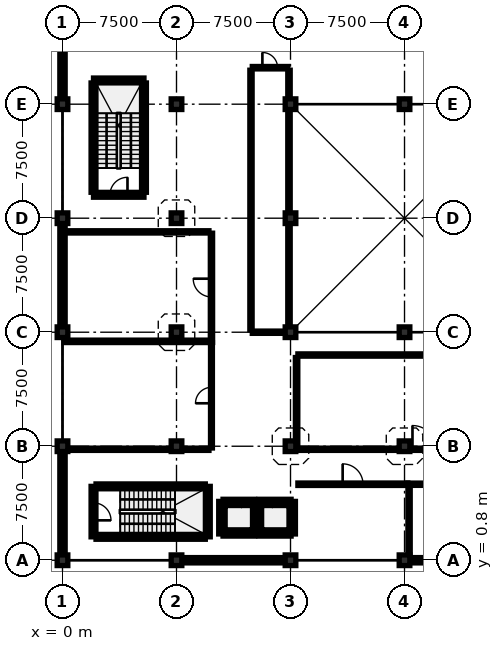
"""IFC4 building model, lengths in metres.
Left out: names, types, materials, properties, quantities, classifications, styles, units other than length and angle.
Written with IfcOpenShell. Run it as: python <this file> out.ifc"""

import sys

from ifc_helpers import new_model, si_unit, direction, frame, frame_2d, origin, origin_2d, place, context, subcontext, project, spatial, rectangle, extrude, element, fill, save


model = new_model("IFC4")
c1 = context("Model", 3, precision=1e-05, world=origin(), true_north=direction((0.0, 1.0)))
c2 = subcontext(c1, "Body", "Model", "MODEL_VIEW")
j1 = project(units=[si_unit("LENGTHUNIT", "METRE"), si_unit("PLANEANGLEUNIT", "RADIAN")], contexts=[c1])
p1 = place(None, origin())
s1 = spatial("IfcSite", under=j1, at=p1, CompositionType="ELEMENT")
p2 = place(p1, origin())
s2 = spatial("IfcBuilding", under=s1, at=p2, CompositionType="ELEMENT")
p3 = place(p2, frame((0.0, 0.0, 5.0)))
s3 = spatial("IfcBuildingStorey", under=s2, at=p3, CompositionType="ELEMENT", Elevation=5.0)
for number, where, z_axis, x_axis in (
    (1, (0.0, 0.8, 0.0), (0.0, 0.0, 1.0), (1.0, 0.0, 0.0)),
    (2, (0.0, 8.3, 0.0), (0.0, 0.0, 1.0), (1.0, 0.0, 0.0)),
    (3, (0.0, 15.8, 0.0), (0.0, 0.0, 1.0), (1.0, 0.0, 0.0)),
    (4, (0.0, 23.3, 0.0), (0.0, 0.0, 1.0), (1.0, 0.0, 0.0)),
    (5, (0.0, 30.8, 0.0), (0.0, 0.0, 1.0), (1.0, 0.0, 0.0)),
    (6, (7.5, 0.8, 0.0), (0.0, 0.0, 1.0), (1.0, 0.0, 0.0)),
    (7, (7.5, 8.3, 0.0), (0.0, 0.0, 1.0), (1.0, 0.0, 0.0)),
    (8, (7.5, 15.8, 0.0), (0.0, 0.0, 1.0), (1.0, 0.0, 0.0)),
    (9, (7.5, 23.3, 0.0), (0.0, 0.0, 1.0), (1.0, 0.0, 0.0)),
    (10, (7.5, 30.8, 0.0), (0.0, 0.0, 1.0), (1.0, 0.0, 0.0)),
    (11, (15.0, 0.8, 0.0), (0.0, 0.0, 1.0), (1.0, 0.0, 0.0)),
    (12, (15.0, 8.3, 0.0), (0.0, 0.0, 1.0), (1.0, 0.0, 0.0)),
    (13, (15.0, 15.8, 0.0), (0.0, 0.0, 1.0), (1.0, 0.0, 0.0)),
    (14, (15.0, 23.3, 0.0), (0.0, 0.0, 1.0), (1.0, 0.0, 0.0)),
    (15, (15.0, 30.8, 0.0), (0.0, 0.0, 1.0), (1.0, 0.0, 0.0)),
    (16, (22.5, 0.8, 0.0), (0.0, 0.0, 1.0), (1.0, 0.0, 0.0)),
    (17, (22.5, 8.3, 0.0), (0.0, 0.0, 1.0), (1.0, 0.0, 0.0)),
    (18, (22.5, 15.8, 0.0), (0.0, 0.0, 1.0), (1.0, 0.0, 0.0)),
    (19, (22.5, 30.8, 0.0), (0.0, 0.0, 1.0), (1.0, 0.0, 0.0)),
):
    element("IfcColumn", number, at=place(p3, frame(where, z_axis=z_axis, x_axis=x_axis)), inside=s3, PredefinedType="COLUMN", context=c2, shape_type="SweptSolid", body=[
        extrude(rectangle(XDim=0.7, YDim=0.7, at=origin_2d()), origin(), (0.0, 0.0, 1.0), 4.2),
    ])
p4 = place(p3, frame((29.65, 0.8, 0.0), z_axis=(0.0, 0.0, 1.0), x_axis=(-1.0, 0.0, 0.0)))
e20 = element("IfcWall", 20, at=p4, inside=s3, PredefinedType="SOLIDWALL", context=c2, shape_type="SweptSolid", body=[
    extrude(rectangle(XDim=6.8, YDim=0.35, at=frame_2d((3.4, 0.0))), origin(), (0.0, 0.0, 1.0), 3.535),
])
p5 = place(p3, frame((14.65, 0.8, 0.0), z_axis=(0.0, 0.0, 1.0), x_axis=(-1.0, 0.0, 0.0)))
e21 = element("IfcWall", 21, at=p5, inside=s3, PredefinedType="SOLIDWALL", context=c2, shape_type="SweptSolid", body=[
    extrude(rectangle(XDim=6.8, YDim=0.35, at=frame_2d((3.4, 0.0))), origin(), (0.0, 0.0, 1.0), 3.535),
])
p6 = place(p5, frame((2.6, 0.0, 0.9)))
e22 = element("IfcOpeningElement", 22, at=p6, cuts=e21, PredefinedType="OPENING", context=c2, shape_type="SweptSolid", body=[
    extrude(rectangle(XDim=1.6, YDim=1.7, at=frame_2d((0.8, 0.85))), frame((0.0, 0.187, 0.0), z_axis=(0.0, -1.0, 0.0), x_axis=(1.0, 0.0, 0.0)), (0.0, 0.0, 1.0), 0.374),
])
for number, where, z_axis, x_axis in (
    (23, (0.0, 1.15, 0.0), (0.0, 0.0, 1.0), (0.0, 1.0, 0.0)),
    (24, (0.0, 16.15, 0.0), (0.0, 0.0, 1.0), (0.0, 1.0, 0.0)),
    (25, (0.0, 31.15, 0.0), (0.0, 0.0, 1.0), (0.0, 1.0, 0.0)),
):
    element("IfcWall", number, at=place(p3, frame(where, z_axis=z_axis, x_axis=x_axis)), inside=s3, PredefinedType="SOLIDWALL", context=c2, shape_type="SweptSolid", body=[
        extrude(rectangle(XDim=6.8, YDim=0.35, at=frame_2d((3.4, 0.0))), origin(), (0.0, 0.0, 1.0), 3.535),
    ])
p7 = place(p3, frame((2.205, 2.34, 0.0), z_axis=(0.0, 0.0, 1.0), x_axis=(1.0, 0.0, 0.0)))
e26 = element("IfcWall", 26, at=p7, inside=s3, PredefinedType="SHEAR", context=c2, shape_type="SweptSolid", body=[
    extrude(rectangle(XDim=7.19, YDim=0.32, at=frame_2d((3.595, 0.0))), origin(), (0.0, 0.0, 1.0), 4.2),
])
p8 = place(p3, frame((9.56, 2.34, 0.0), z_axis=(0.0, 0.0, 1.0), x_axis=(0.0, 1.0, 0.0)))
e27 = element("IfcWall", 27, at=p8, inside=s3, PredefinedType="SHEAR", context=c2, shape_type="SweptSolid", body=[
    extrude(rectangle(XDim=3.32, YDim=0.32, at=frame_2d((1.66, 0.0))), origin(), (0.0, 0.0, 1.0), 4.2),
])
p9 = place(p3, frame((9.395, 5.66, 0.0), z_axis=(0.0, 0.0, 1.0), x_axis=(-1.0, 0.0, 0.0)))
e28 = element("IfcWall", 28, at=p9, inside=s3, PredefinedType="SHEAR", context=c2, shape_type="SweptSolid", body=[
    extrude(rectangle(XDim=7.19, YDim=0.32, at=frame_2d((3.595, 0.0))), origin(), (0.0, 0.0, 1.0), 4.2),
])
p10 = place(p3, frame((2.04, 5.66, 0.0), z_axis=(0.0, 0.0, 1.0), x_axis=(0.0, -1.0, 0.0)))
e29 = element("IfcWall", 29, at=p10, inside=s3, PredefinedType="SHEAR", context=c2, shape_type="SweptSolid", body=[
    extrude(rectangle(XDim=3.32, YDim=0.32, at=frame_2d((1.66, 0.0))), origin(), (0.0, 0.0, 1.0), 4.2),
])
p11 = place(p10, frame((1.085, 0.0, 0.0)))
e30 = element("IfcOpeningElement", 30, at=p11, cuts=e29, PredefinedType="OPENING", context=c2, shape_type="SweptSolid", body=[
    extrude(rectangle(XDim=1.15, YDim=2.15, at=frame_2d((0.575, 1.075))), frame((0.0, 0.172, 0.0), z_axis=(0.0, -1.0, 0.0), x_axis=(1.0, 0.0, 0.0)), (0.0, 0.0, 1.0), 0.344),
])
p12 = place(p3, frame((10.562, 2.529, 0.0), z_axis=(0.0, 0.0, 1.0), x_axis=(1.0, 0.0, 0.0)))
e31 = element("IfcWall", 31, at=p12, inside=s3, PredefinedType="SHEAR", context=c2, shape_type="SweptSolid", body=[
    extrude(rectangle(XDim=2.077, YDim=0.28, at=frame_2d((1.039, 0.0))), origin(), (0.0, 0.0, 1.0), 4.2),
])
p13 = place(p3, frame((12.783, 2.529, 0.0), z_axis=(0.0, 0.0, 1.0), x_axis=(0.0, 1.0, 0.0)))
e32 = element("IfcWall", 32, at=p13, inside=s3, PredefinedType="SHEAR", context=c2, shape_type="SweptSolid", body=[
    extrude(rectangle(XDim=2.141, YDim=0.28, at=frame_2d((1.071, 0.0))), origin(), (0.0, 0.0, 1.0), 4.2),
])
p14 = place(p3, frame((12.638, 4.671, 0.0), z_axis=(0.0, 0.0, 1.0), x_axis=(-1.0, 0.0, 0.0)))
e33 = element("IfcWall", 33, at=p14, inside=s3, PredefinedType="SHEAR", context=c2, shape_type="SweptSolid", body=[
    extrude(rectangle(XDim=2.077, YDim=0.28, at=frame_2d((1.039, 0.0))), origin(), (0.0, 0.0, 1.0), 4.2),
])
p15 = place(p14, frame((0.489, 0.0, 0.0)))
e34 = element("IfcOpeningElement", 34, at=p15, cuts=e33, PredefinedType="OPENING", context=c2, shape_type="SweptSolid", body=[
    extrude(rectangle(XDim=1.1, YDim=2.15, at=frame_2d((0.55, 1.075))), frame((0.0, 0.152, 0.0), z_axis=(0.0, -1.0, 0.0), x_axis=(1.0, 0.0, 0.0)), (0.0, 0.0, 1.0), 0.304),
])
p16 = place(p3, frame((10.417, 4.671, 0.0), z_axis=(0.0, 0.0, 1.0), x_axis=(0.0, -1.0, 0.0)))
e35 = element("IfcWall", 35, at=p16, inside=s3, PredefinedType="SHEAR", context=c2, shape_type="SweptSolid", body=[
    extrude(rectangle(XDim=2.141, YDim=0.28, at=frame_2d((1.071, 0.0))), origin(), (0.0, 0.0, 1.0), 4.2),
])
p17 = place(p3, frame((12.928, 2.529, 0.0), z_axis=(0.0, 0.0, 1.0), x_axis=(1.0, 0.0, 0.0)))
e36 = element("IfcWall", 36, at=p17, inside=s3, PredefinedType="SHEAR", context=c2, shape_type="SweptSolid", body=[
    extrude(rectangle(XDim=2.11, YDim=0.28, at=frame_2d((1.055, 0.0))), origin(), (0.0, 0.0, 1.0), 4.2),
])
p18 = place(p3, frame((15.184, 2.529, 0.0), z_axis=(0.0, 0.0, 1.0), x_axis=(0.0, 1.0, 0.0)))
e37 = element("IfcWall", 37, at=p18, inside=s3, PredefinedType="SHEAR", context=c2, shape_type="SweptSolid", body=[
    extrude(rectangle(XDim=2.141, YDim=0.28, at=frame_2d((1.071, 0.0))), origin(), (0.0, 0.0, 1.0), 4.2),
])
p19 = place(p3, frame((15.039, 4.671, 0.0), z_axis=(0.0, 0.0, 1.0), x_axis=(-1.0, 0.0, 0.0)))
e38 = element("IfcWall", 38, at=p19, inside=s3, PredefinedType="SHEAR", context=c2, shape_type="SweptSolid", body=[
    extrude(rectangle(XDim=2.11, YDim=0.28, at=frame_2d((1.055, 0.0))), origin(), (0.0, 0.0, 1.0), 4.2),
])
p20 = place(p19, frame((0.505, 0.0, 0.0)))
e39 = element("IfcOpeningElement", 39, at=p20, cuts=e38, PredefinedType="OPENING", context=c2, shape_type="SweptSolid", body=[
    extrude(rectangle(XDim=1.1, YDim=2.15, at=frame_2d((0.55, 1.075))), frame((0.0, 0.152, 0.0), z_axis=(0.0, -1.0, 0.0), x_axis=(1.0, 0.0, 0.0)), (0.0, 0.0, 1.0), 0.304),
])
p21 = place(p3, frame((5.36, 25.005, 0.0), z_axis=(0.0, 0.0, 1.0), x_axis=(0.0, 1.0, 0.0)))
e40 = element("IfcWall", 40, at=p21, inside=s3, PredefinedType="SHEAR", context=c2, shape_type="SweptSolid", body=[
    extrude(rectangle(XDim=7.19, YDim=0.32, at=frame_2d((3.595, 0.0))), origin(), (0.0, 0.0, 1.0), 4.2),
])
p22 = place(p3, frame((5.36, 32.36, 0.0), z_axis=(0.0, 0.0, 1.0), x_axis=(-1.0, 0.0, 0.0)))
e41 = element("IfcWall", 41, at=p22, inside=s3, PredefinedType="SHEAR", context=c2, shape_type="SweptSolid", body=[
    extrude(rectangle(XDim=3.32, YDim=0.32, at=frame_2d((1.66, 0.0))), origin(), (0.0, 0.0, 1.0), 4.2),
])
p23 = place(p3, frame((2.04, 32.195, 0.0), z_axis=(0.0, 0.0, 1.0), x_axis=(0.0, -1.0, 0.0)))
e42 = element("IfcWall", 42, at=p23, inside=s3, PredefinedType="SHEAR", context=c2, shape_type="SweptSolid", body=[
    extrude(rectangle(XDim=7.19, YDim=0.32, at=frame_2d((3.595, 0.0))), origin(), (0.0, 0.0, 1.0), 4.2),
])
p24 = place(p3, frame((2.04, 24.84, 0.0), z_axis=(0.0, 0.0, 1.0), x_axis=(1.0, 0.0, 0.0)))
e43 = element("IfcWall", 43, at=p24, inside=s3, PredefinedType="SHEAR", context=c2, shape_type="SweptSolid", body=[
    extrude(rectangle(XDim=3.32, YDim=0.32, at=frame_2d((1.66, 0.0))), origin(), (0.0, 0.0, 1.0), 4.2),
])
p25 = place(p24, frame((1.085, 0.0, 0.0)))
e44 = element("IfcOpeningElement", 44, at=p25, cuts=e43, PredefinedType="OPENING", context=c2, shape_type="SweptSolid", body=[
    extrude(rectangle(XDim=1.15, YDim=2.15, at=frame_2d((0.575, 1.075))), frame((0.0, 0.172, 0.0), z_axis=(0.0, -1.0, 0.0), x_axis=(1.0, 0.0, 0.0)), (0.0, 0.0, 1.0), 0.344),
])
p26 = place(p3, frame((15.485, 5.8, 0.0), z_axis=(0.0, 0.0, 1.0), x_axis=(1.0, 0.0, 0.0)))
e45 = element("IfcWall", 45, at=p26, inside=s3, PredefinedType="PARTITIONING", context=c2, shape_type="SweptSolid", body=[
    extrude(rectangle(XDim=7.23, YDim=0.16, at=frame_2d((3.615, 0.0))), origin(), (0.0, 0.0, 1.0), 3.265),
])
p27 = place(p26, frame((2.945, 0.0, 0.0)))
e46 = element("IfcOpeningElement", 46, at=p27, cuts=e45, PredefinedType="OPENING", context=c2, shape_type="SweptSolid", body=[
    extrude(rectangle(XDim=1.34, YDim=2.24, at=frame_2d((0.67, 1.12))), frame((0.0, 0.092, 0.0), z_axis=(0.0, -1.0, 0.0), x_axis=(1.0, 0.0, 0.0)), (0.0, 0.0, 1.0), 0.184),
])
p28 = place(p3, frame((22.727, 5.8, 0.0), z_axis=(0.0, 0.0, 1.0), x_axis=(1.0, 0.0, 0.0)))
e47 = element("IfcWall", 47, at=p28, inside=s3, PredefinedType="PARTITIONING", context=c2, shape_type="SweptSolid", body=[
    extrude(rectangle(XDim=7.388, YDim=0.15, at=frame_2d((3.694, 0.0))), origin(), (0.0, 0.0, 1.0), 3.265),
])
p29 = place(p28, frame((2.994, 0.0, 0.0)))
e48 = element("IfcOpeningElement", 48, at=p29, cuts=e47, PredefinedType="OPENING", context=c2, shape_type="SweptSolid", body=[
    extrude(rectangle(XDim=1.4, YDim=2.25, at=frame_2d((0.7, 1.125))), frame((0.0, 0.087, 0.0), z_axis=(0.0, -1.0, 0.0), x_axis=(1.0, 0.0, 0.0)), (0.0, 0.0, 1.0), 0.174),
])
p30 = place(p3, frame((15.362, 8.1, 0.0), z_axis=(0.0, 0.0, 1.0), x_axis=(1.0, 0.0, 0.0)))
e49 = element("IfcWall", 49, at=p30, inside=s3, PredefinedType="PARTITIONING", context=c2, shape_type="SweptSolid", body=[
    extrude(rectangle(XDim=14.546, YDim=0.15, at=frame_2d((7.273, 0.0))), origin(), (0.0, 0.0, 1.0), 3.265),
])
p31 = place(p30, frame((7.662, 0.0, 0.0)))
e50 = element("IfcOpeningElement", 50, at=p31, cuts=e49, PredefinedType="OPENING", context=c2, shape_type="SweptSolid", body=[
    extrude(rectangle(XDim=1.56, YDim=2.3, at=frame_2d((0.78, 1.15))), frame((0.0, 0.087, 0.0), z_axis=(0.0, -1.0, 0.0), x_axis=(1.0, 0.0, 0.0)), (0.0, 0.0, 1.0), 0.174),
])
p32 = place(p3, frame((9.8, 8.185, 0.0), z_axis=(0.0, 0.0, 1.0), x_axis=(0.0, 1.0, 0.0)))
e51 = element("IfcWall", 51, at=p32, inside=s3, PredefinedType="PARTITIONING", context=c2, shape_type="SweptSolid", body=[
    extrude(rectangle(XDim=6.93, YDim=0.125, at=frame_2d((3.465, 0.0))), origin(), (0.0, 0.0, 1.0), 3.265),
])
p33 = place(p32, frame((2.94, 0.0, 0.0)))
e52 = element("IfcOpeningElement", 52, at=p33, cuts=e51, PredefinedType="OPENING", context=c2, shape_type="SweptSolid", body=[
    extrude(rectangle(XDim=1.05, YDim=2.15, at=frame_2d((0.525, 1.075))), frame((0.0, 0.074, 0.0), z_axis=(0.0, -1.0, 0.0), x_axis=(1.0, 0.0, 0.0)), (0.0, 0.0, 1.0), 0.149),
])
p34 = place(p3, frame((9.8, 15.127, 0.0), z_axis=(0.0, 0.0, 1.0), x_axis=(0.0, 1.0, 0.0)))
e53 = element("IfcWall", 53, at=p34, inside=s3, PredefinedType="PARTITIONING", context=c2, shape_type="SweptSolid", body=[
    extrude(rectangle(XDim=7.188, YDim=0.15, at=frame_2d((3.594, 0.0))), origin(), (0.0, 0.0, 1.0), 3.265),
])
p35 = place(p34, frame((2.994, 0.0, 0.0)))
e54 = element("IfcOpeningElement", 54, at=p35, cuts=e53, PredefinedType="OPENING", context=c2, shape_type="SweptSolid", body=[
    extrude(rectangle(XDim=1.2, YDim=2.15, at=frame_2d((0.6, 1.075))), frame((0.0, 0.087, 0.0), z_axis=(0.0, -1.0, 0.0), x_axis=(1.0, 0.0, 0.0)), (0.0, 0.0, 1.0), 0.174),
])
p36 = place(p3, frame((12.485, 33.2, 0.0), z_axis=(0.0, 0.0, 1.0), x_axis=(1.0, 0.0, 0.0)))
e55 = element("IfcWall", 55, at=p36, inside=s3, PredefinedType="PARTITIONING", context=c2, shape_type="SweptSolid", body=[
    extrude(rectangle(XDim=2.33, YDim=0.16, at=frame_2d((1.165, 0.0))), origin(), (0.0, 0.0, 1.0), 3.265),
])
p37 = place(p36, frame((0.665, 0.0, 0.0)))
e56 = element("IfcOpeningElement", 56, at=p37, cuts=e55, PredefinedType="OPENING", context=c2, shape_type="SweptSolid", body=[
    extrude(rectangle(XDim=1.0, YDim=2.22, at=frame_2d((0.5, 1.11))), frame((0.0, 0.092, 0.0), z_axis=(0.0, -1.0, 0.0), x_axis=(1.0, 0.0, 0.0)), (0.0, 0.0, 1.0), 0.184),
])
p38 = place(p3, frame((15.485, 14.3, 0.0), z_axis=(0.0, 0.0, 1.0), x_axis=(1.0, 0.0, 0.0)))
e57 = element("IfcWall", 57, at=p38, inside=s3, PredefinedType="PARTITIONING", context=c2, shape_type="SweptSolid", body=[
    extrude(rectangle(XDim=14.59, YDim=0.15, at=frame_2d((7.295, 0.0))), origin(), (0.0, 0.0, 1.0), 3.265),
])
p39 = place(p3, frame((12.485, 15.8, 0.0), z_axis=(0.0, 0.0, 1.0), x_axis=(1.0, 0.0, 0.0)))
e58 = element("IfcWall", 58, at=p39, inside=s3, PredefinedType="PARTITIONING", context=c2, shape_type="SweptSolid", body=[
    extrude(rectangle(XDim=2.163, YDim=0.15, at=frame_2d((1.082, 0.0))), origin(), (0.0, 0.0, 1.0), 3.265),
])
p40 = place(p3, frame((22.8, 1.162, 0.0), z_axis=(0.0, 0.0, 1.0), x_axis=(0.0, 1.0, 0.0)))
e59 = element("IfcWall", 59, at=p40, inside=s3, PredefinedType="PARTITIONING", context=c2, shape_type="SweptSolid", body=[
    extrude(rectangle(XDim=4.551, YDim=0.15, at=frame_2d((2.275, 0.0))), origin(), (0.0, 0.0, 1.0), 3.265),
])
p41 = place(p3, frame((15.4, 8.187, 0.0), z_axis=(0.0, 0.0, 1.0), x_axis=(0.0, 1.0, 0.0)))
e60 = element("IfcWall", 60, at=p41, inside=s3, PredefinedType="PARTITIONING", context=c2, shape_type="SweptSolid", body=[
    extrude(rectangle(XDim=5.948, YDim=0.16, at=frame_2d((2.974, 0.0))), origin(), (0.0, 0.0, 1.0), 3.265),
])
p42 = place(p3, frame((0.362, 8.1, 0.0), z_axis=(0.0, 0.0, 1.0), x_axis=(1.0, 0.0, 0.0)))
e61 = element("IfcWall", 61, at=p42, inside=s3, PredefinedType="PARTITIONING", context=c2, shape_type="SweptSolid", body=[
    extrude(rectangle(XDim=9.273, YDim=0.15, at=frame_2d((4.636, 0.0))), origin(), (0.0, 0.0, 1.0), 3.265),
])
p43 = place(p3, frame((0.102, 15.2, 0.0), z_axis=(0.0, 0.0, 1.0), x_axis=(1.0, 0.0, 0.0)))
e62 = element("IfcWall", 62, at=p43, inside=s3, PredefinedType="PARTITIONING", context=c2, shape_type="SweptSolid", body=[
    extrude(rectangle(XDim=9.611, YDim=0.16, at=frame_2d((4.805, 0.0))), origin(), (0.0, 0.0, 1.0), 3.265),
])
p44 = place(p3, frame((0.187, 22.4, 0.0), z_axis=(0.0, 0.0, 1.0), x_axis=(1.0, 0.0, 0.0)))
e63 = element("IfcWall", 63, at=p44, inside=s3, PredefinedType="PARTITIONING", context=c2, shape_type="SweptSolid", body=[
    extrude(rectangle(XDim=9.448, YDim=0.15, at=frame_2d((4.724, 0.0))), origin(), (0.0, 0.0, 1.0), 3.265),
])
p45 = place(p3, frame((12.4, 15.965, 0.0), z_axis=(0.0, 0.0, 1.0), x_axis=(0.0, 1.0, 0.0)))
e64 = element("IfcWall", 64, at=p45, inside=s3, PredefinedType="PARTITIONING", context=c2, shape_type="SweptSolid", body=[
    extrude(rectangle(XDim=17.07, YDim=0.15, at=frame_2d((8.535, 0.0))), origin(), (0.0, 0.0, 1.0), 3.265),
])
p46 = place(p3, frame((14.9, 16.132, 0.0), z_axis=(0.0, 0.0, 1.0), x_axis=(0.0, 1.0, 0.0)))
e65 = element("IfcWall", 65, at=p46, inside=s3, PredefinedType="PARTITIONING", context=c2, shape_type="SweptSolid", body=[
    extrude(rectangle(XDim=16.903, YDim=0.16, at=frame_2d((8.451, 0.0))), origin(), (0.0, 0.0, 1.0), 3.265),
])
p47 = place(p6, origin())
e66 = element("IfcWindow", 66, at=p47, inside=s3, PartitioningType="DOUBLE_PANEL_VERTICAL", PredefinedType="WINDOW", context=c2, shape_type="SweptSolid", body=[
    extrude(rectangle(XDim=1.6, YDim=1.7, at=frame_2d((0.8, 0.85))), frame((0.0, 0.03, 0.0), z_axis=(0.0, -1.0, 0.0), x_axis=(1.0, 0.0, 0.0)), (0.0, 0.0, 1.0), 0.06),
])
fill(e22, e66)
p48 = place(p11, origin())
e67 = element("IfcDoor", 67, at=p48, inside=s3, OperationType="SINGLE_SWING_RIGHT", PredefinedType="DOOR", context=c2, shape_type="SweptSolid", body=[
    extrude(rectangle(XDim=1.15, YDim=2.15, at=frame_2d((0.575, 1.075))), frame((0.0, 0.025, 0.0), z_axis=(0.0, -1.0, 0.0), x_axis=(1.0, 0.0, 0.0)), (0.0, 0.0, 1.0), 0.05),
])
fill(e30, e67)
p49 = place(p15, origin())
e68 = element("IfcDoor", 68, at=p49, inside=s3, OperationType="SLIDING_TO_LEFT", PredefinedType="DOOR", context=c2, shape_type="SweptSolid", body=[
    extrude(rectangle(XDim=1.1, YDim=2.15, at=frame_2d((0.55, 1.075))), frame((0.0, 0.025, 0.0), z_axis=(0.0, -1.0, 0.0), x_axis=(1.0, 0.0, 0.0)), (0.0, 0.0, 1.0), 0.05),
])
fill(e34, e68)
p50 = place(p20, origin())
e69 = element("IfcDoor", 69, at=p50, inside=s3, OperationType="SLIDING_TO_RIGHT", PredefinedType="DOOR", context=c2, shape_type="SweptSolid", body=[
    extrude(rectangle(XDim=1.1, YDim=2.15, at=frame_2d((0.55, 1.075))), frame((0.0, 0.025, 0.0), z_axis=(0.0, -1.0, 0.0), x_axis=(1.0, 0.0, 0.0)), (0.0, 0.0, 1.0), 0.05),
])
fill(e39, e69)
p51 = place(p25, origin())
e70 = element("IfcDoor", 70, at=p51, inside=s3, OperationType="SINGLE_SWING_RIGHT", PredefinedType="DOOR", context=c2, shape_type="SweptSolid", body=[
    extrude(rectangle(XDim=1.15, YDim=2.15, at=frame_2d((0.575, 1.075))), frame((0.0, 0.025, 0.0), z_axis=(0.0, -1.0, 0.0), x_axis=(1.0, 0.0, 0.0)), (0.0, 0.0, 1.0), 0.05),
])
fill(e44, e70)
p52 = place(p27, origin())
e71 = element("IfcDoor", 71, at=p52, inside=s3, OperationType="SINGLE_SWING_LEFT", PredefinedType="DOOR", context=c2, shape_type="SweptSolid", body=[
    extrude(rectangle(XDim=1.34, YDim=2.24, at=frame_2d((0.67, 1.12))), frame((0.0, 0.025, 0.0), z_axis=(0.0, -1.0, 0.0), x_axis=(1.0, 0.0, 0.0)), (0.0, 0.0, 1.0), 0.05),
])
fill(e46, e71)
p53 = place(p31, origin())
e72 = element("IfcDoor", 72, at=p53, inside=s3, OperationType="SINGLE_SWING_LEFT", PredefinedType="DOOR", context=c2, shape_type="SweptSolid", body=[
    extrude(rectangle(XDim=1.56, YDim=2.3, at=frame_2d((0.78, 1.15))), frame((0.0, 0.025, 0.0), z_axis=(0.0, -1.0, 0.0), x_axis=(1.0, 0.0, 0.0)), (0.0, 0.0, 1.0), 0.05),
])
fill(e50, e72)
p54 = place(p33, origin())
e73 = element("IfcDoor", 73, at=p54, inside=s3, OperationType="SINGLE_SWING_LEFT", PredefinedType="DOOR", context=c2, shape_type="SweptSolid", body=[
    extrude(rectangle(XDim=1.05, YDim=2.15, at=frame_2d((0.525, 1.075))), frame((0.0, 0.025, 0.0), z_axis=(0.0, -1.0, 0.0), x_axis=(1.0, 0.0, 0.0)), (0.0, 0.0, 1.0), 0.05),
])
fill(e52, e73)
p55 = place(p35, origin())
e74 = element("IfcDoor", 74, at=p55, inside=s3, OperationType="SINGLE_SWING_RIGHT", PredefinedType="DOOR", context=c2, shape_type="SweptSolid", body=[
    extrude(rectangle(XDim=1.2, YDim=2.15, at=frame_2d((0.6, 1.075))), frame((0.0, 0.025, 0.0), z_axis=(0.0, -1.0, 0.0), x_axis=(1.0, 0.0, 0.0)), (0.0, 0.0, 1.0), 0.05),
])
fill(e54, e74)
p56 = place(p37, origin())
e75 = element("IfcDoor", 75, at=p56, inside=s3, OperationType="SINGLE_SWING_LEFT", PredefinedType="DOOR", context=c2, shape_type="SweptSolid", body=[
    extrude(rectangle(XDim=1.0, YDim=2.22, at=frame_2d((0.5, 1.11))), frame((0.0, 0.025, 0.0), z_axis=(0.0, -1.0, 0.0), x_axis=(1.0, 0.0, 0.0)), (0.0, 0.0, 1.0), 0.05),
])
fill(e56, e75)
save(model, sys.argv[1])
